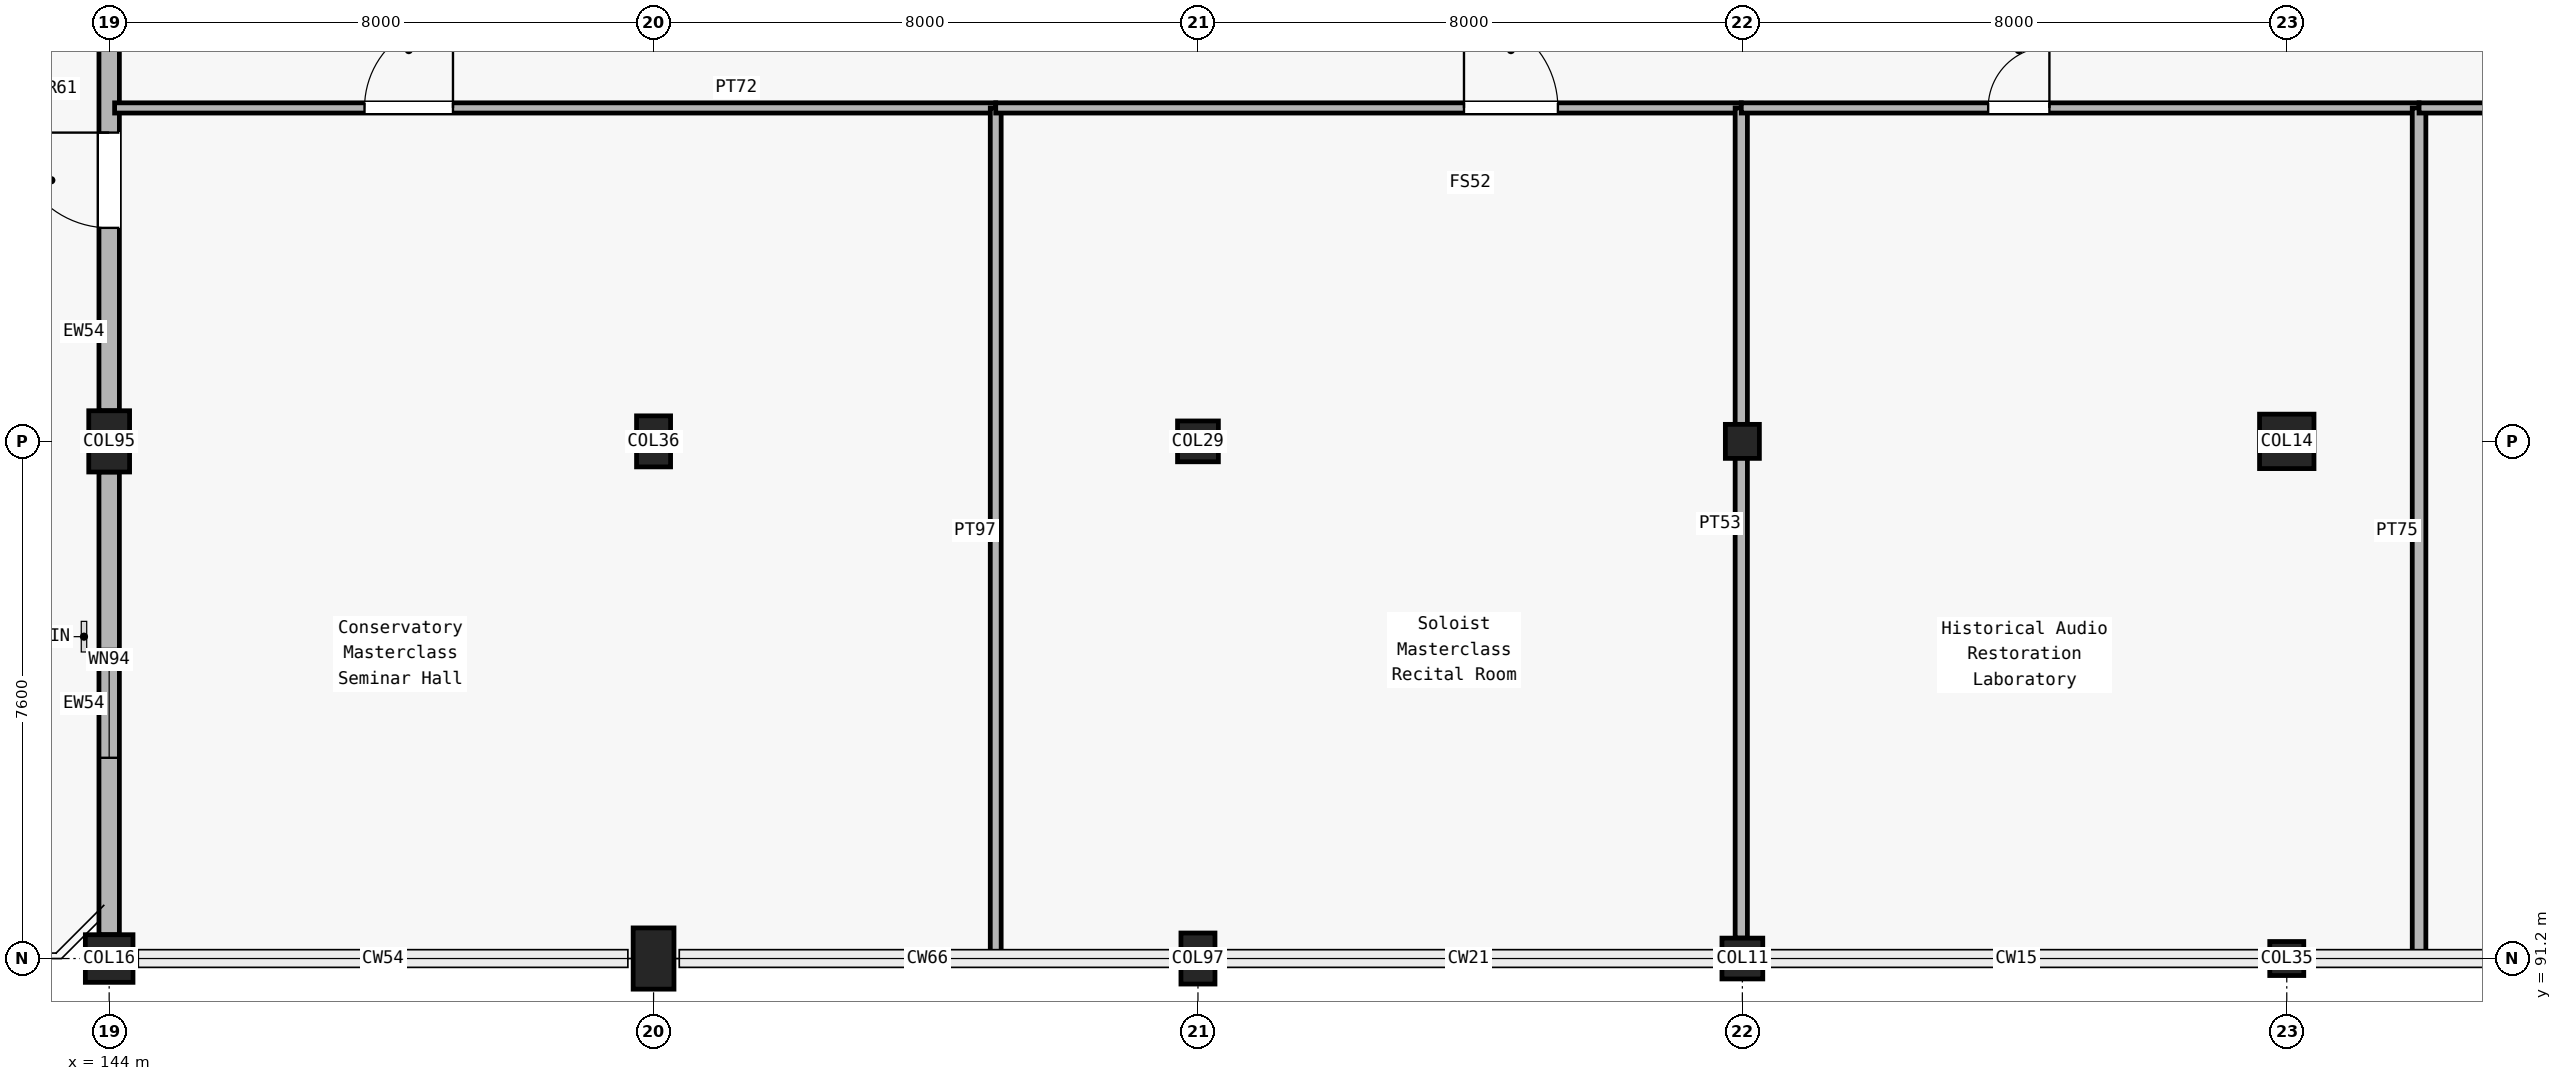
"""IFC4 building model, lengths in metres.
Left out: names, types, materials, properties, quantities, classifications, styles, units other than length and angle.
Written with IfcOpenShell. Run it as: python <this file> out.ifc"""

import sys

from ifc_helpers import new_model, si_unit, direction, frame, frame_2d, origin, origin_2d, place, context, subcontext, project, spatial, rectangle, circle, extrude, element, fill, save


model = new_model("IFC4")
c1 = context("Model", 3, precision=1e-05, world=origin(), true_north=direction((0.0, 1.0)))
c2 = subcontext(c1, "Body", "Model", "MODEL_VIEW")
j1 = project(units=[si_unit("LENGTHUNIT", "METRE"), si_unit("PLANEANGLEUNIT", "RADIAN")], contexts=[c1])
p1 = place(None, origin())
s1 = spatial("IfcSite", under=j1, at=p1, CompositionType="ELEMENT")
p2 = place(p1, origin())
s2 = spatial("IfcBuilding", under=s1, at=p2, CompositionType="ELEMENT")
p3 = place(p2, frame((0.0, 0.0, 24.6)))
s3 = spatial("IfcBuildingStorey", under=s2, at=p3, CompositionType="ELEMENT", Elevation=24.6)
p4 = place(p3, frame((144.0, 91.2, 0.0), z_axis=(0.0, 0.0, 1.0), x_axis=(1.0, 0.0, 0.0)))
e1 = element("IfcColumn", 1, at=p4, inside=s3, PredefinedType="COLUMN", context=c2, shape_type="SweptSolid", body=[
    extrude(rectangle(XDim=0.7, YDim=0.7, at=origin_2d()), origin(), (0.0, 0.0, 1.0), 4.8),
])
for number, where, z_axis, x_axis in (
    (2, (144.0, 98.8, 0.0), (0.0, 0.0, 1.0), (1.0, 0.0, 0.0)),
    (3, (152.0, 91.2, 0.0), (0.0, 0.0, 1.0), (1.0, 0.0, 0.0)),
):
    element("IfcColumn", number, at=place(p3, frame(where, z_axis=z_axis, x_axis=x_axis)), inside=s3, PredefinedType="COLUMN", context=c2, shape_type="SweptSolid", body=[
        extrude(rectangle(XDim=0.6, YDim=0.9, at=origin_2d()), origin(), (0.0, 0.0, 1.0), 4.8),
    ])
for number, where, z_axis, x_axis in (
    (4, (152.0, 98.8, 0.0), (0.0, 0.0, 1.0), (1.0, 0.0, 0.0)),
    (5, (160.0, 91.2, 0.0), (0.0, 0.0, 1.0), (1.0, 0.0, 0.0)),
):
    element("IfcColumn", number, at=place(p3, frame(where, z_axis=z_axis, x_axis=x_axis)), inside=s3, PredefinedType="COLUMN", context=c2, shape_type="SweptSolid", body=[
        extrude(rectangle(XDim=0.5, YDim=0.75, at=origin_2d()), origin(), (0.0, 0.0, 1.0), 4.8),
    ])
for number, where, z_axis, x_axis in (
    (6, (160.0, 98.8, 0.0), (0.0, 0.0, 1.0), (1.0, 0.0, 0.0)),
    (7, (168.0, 91.2, 0.0), (0.0, 0.0, 1.0), (1.0, 0.0, 0.0)),
):
    element("IfcColumn", number, at=place(p3, frame(where, z_axis=z_axis, x_axis=x_axis)), inside=s3, PredefinedType="COLUMN", context=c2, shape_type="SweptSolid", body=[
        extrude(rectangle(XDim=0.6, YDim=0.6, at=origin_2d()), origin(), (0.0, 0.0, 1.0), 4.8),
    ])
for number, where, z_axis, x_axis in (
    (8, (168.0, 98.8, 0.0), (0.0, 0.0, 1.0), (1.0, 0.0, 0.0)),
    (9, (176.0, 91.2, 0.0), (0.0, 0.0, 1.0), (1.0, 0.0, 0.0)),
):
    element("IfcColumn", number, at=place(p3, frame(where, z_axis=z_axis, x_axis=x_axis)), inside=s3, PredefinedType="COLUMN", context=c2, shape_type="SweptSolid", body=[
        extrude(rectangle(XDim=0.5, YDim=0.5, at=origin_2d()), origin(), (0.0, 0.0, 1.0), 4.8),
    ])
p5 = place(p3, frame((176.0, 98.8, 0.0), z_axis=(0.0, 0.0, 1.0), x_axis=(1.0, 0.0, 0.0)))
e10 = element("IfcColumn", 10, at=p5, inside=s3, PredefinedType="COLUMN", context=c2, shape_type="SweptSolid", body=[
    extrude(circle(Radius=0.4, at=origin_2d()), origin(), (0.0, 0.0, 1.0), 4.8),
])
p6 = place(p3, frame((144.0, 91.55, 0.0), z_axis=(0.0, 0.0, 1.0), x_axis=(0.0, 1.0, 0.0)))
e11 = element("IfcWall", 11, at=p6, inside=s3, PredefinedType="SOLIDWALL", context=c2, shape_type="SweptSolid", body=[
    extrude(rectangle(XDim=6.8, YDim=0.3, at=frame_2d((3.4, 0.0))), origin(), (0.0, 0.0, 1.0), 4.14),
])
p7 = place(p6, frame((2.6, 0.0, 0.95)))
e12 = element("IfcOpeningElement", 12, at=p7, cuts=e11, PredefinedType="OPENING", context=c2, shape_type="SweptSolid", body=[
    extrude(rectangle(XDim=1.6, YDim=1.95, at=frame_2d((0.8, 0.975))), frame((0.0, 0.16, 0.0), z_axis=(0.0, -1.0, 0.0), x_axis=(1.0, 0.0, 0.0)), (0.0, 0.0, 1.0), 0.32),
])
p8 = place(p3, frame((144.0, 99.25, 0.0), z_axis=(0.0, 0.0, 1.0), x_axis=(0.0, 1.0, 0.0)))
e13 = element("IfcWall", 13, at=p8, inside=s3, PredefinedType="SOLIDWALL", context=c2, shape_type="SweptSolid", body=[
    extrude(rectangle(XDim=6.775, YDim=0.3, at=frame_2d((3.387, 0.0))), origin(), (0.0, 0.0, 1.0), 4.14),
])
p9 = place(p8, frame((2.688, 0.0, 0.0)))
e14 = element("IfcOpeningElement", 14, at=p9, cuts=e13, PredefinedType="OPENING", context=c2, shape_type="SweptSolid", body=[
    extrude(rectangle(XDim=1.4, YDim=2.2, at=frame_2d((0.7, 1.1))), frame((0.0, 0.16, 0.0), z_axis=(0.0, -1.0, 0.0), x_axis=(1.0, 0.0, 0.0)), (0.0, 0.0, 1.0), 0.32),
])
p10 = place(p3, frame((144.08, 103.7, 0.0), z_axis=(0.0, 0.0, 1.0), x_axis=(1.0, 0.0, 0.0)))
e15 = element("IfcWall", 15, at=p10, inside=s3, PredefinedType="PARTITIONING", context=c2, shape_type="SweptSolid", body=[
    extrude(rectangle(XDim=12.948, YDim=0.15, at=frame_2d((6.474, 0.0))), origin(), (0.0, 0.0, 1.0), 3.9),
])
p11 = place(p10, frame((3.672, 0.0, 0.0)))
e16 = element("IfcOpeningElement", 16, at=p11, cuts=e15, PredefinedType="OPENING", context=c2, shape_type="SweptSolid", body=[
    extrude(rectangle(XDim=1.3, YDim=2.2, at=frame_2d((0.65, 1.1))), frame((0.0, 0.085, 0.0), z_axis=(0.0, -1.0, 0.0), x_axis=(1.0, 0.0, 0.0)), (0.0, 0.0, 1.0), 0.17),
])
p12 = place(p3, frame((157.028, 91.28, 0.0), z_axis=(0.0, 0.0, 1.0), x_axis=(0.0, 1.0, 0.0)))
e17 = element("IfcWall", 17, at=p12, inside=s3, PredefinedType="PARTITIONING", context=c2, shape_type="SweptSolid", body=[
    extrude(rectangle(XDim=12.42, YDim=0.16, at=frame_2d((6.21, 0.0))), origin(), (0.0, 0.0, 1.0), 3.9),
])
p13 = place(p3, frame((157.028, 103.7, 0.0), z_axis=(0.0, 0.0, 1.0), x_axis=(1.0, 0.0, 0.0)))
e18 = element("IfcWall", 18, at=p13, inside=s3, PredefinedType="PARTITIONING", context=c2, shape_type="SweptSolid", body=[
    extrude(rectangle(XDim=10.956, YDim=0.15, at=frame_2d((5.478, 0.0))), origin(), (0.0, 0.0, 1.0), 3.9),
])
p14 = place(p13, frame((6.881, 0.0, 0.0)))
e19 = element("IfcOpeningElement", 19, at=p14, cuts=e18, PredefinedType="OPENING", context=c2, shape_type="SweptSolid", body=[
    extrude(rectangle(XDim=1.38, YDim=2.2, at=frame_2d((0.69, 1.1))), frame((0.0, 0.085, 0.0), z_axis=(0.0, -1.0, 0.0), x_axis=(1.0, 0.0, 0.0)), (0.0, 0.0, 1.0), 0.17),
])
p15 = place(p3, frame((167.984, 91.5, 0.0), z_axis=(0.0, 0.0, 1.0), x_axis=(0.0, 1.0, 0.0)))
e20 = element("IfcWall", 20, at=p15, inside=s3, PredefinedType="PARTITIONING", context=c2, shape_type="SweptSolid", body=[
    extrude(rectangle(XDim=12.2, YDim=0.18, at=frame_2d((6.1, 0.0))), origin(), (0.0, 0.0, 1.0), 3.9),
])
p16 = place(p3, frame((167.984, 103.7, 0.0), z_axis=(0.0, 0.0, 1.0), x_axis=(1.0, 0.0, 0.0)))
e21 = element("IfcWall", 21, at=p16, inside=s3, PredefinedType="PARTITIONING", context=c2, shape_type="SweptSolid", body=[
    extrude(rectangle(XDim=9.96, YDim=0.15, at=frame_2d((4.98, 0.0))), origin(), (0.0, 0.0, 1.0), 3.9),
])
p17 = place(p16, frame((3.628, 0.0, 0.0)))
e22 = element("IfcOpeningElement", 22, at=p17, cuts=e21, PredefinedType="OPENING", context=c2, shape_type="SweptSolid", body=[
    extrude(rectangle(XDim=0.9, YDim=2.05, at=frame_2d((0.45, 1.025))), frame((0.0, 0.085, 0.0), z_axis=(0.0, -1.0, 0.0), x_axis=(1.0, 0.0, 0.0)), (0.0, 0.0, 1.0), 0.17),
])
p18 = place(p3, frame((177.944, 91.28, 0.0), z_axis=(0.0, 0.0, 1.0), x_axis=(0.0, 1.0, 0.0)))
e23 = element("IfcWall", 23, at=p18, inside=s3, PredefinedType="PARTITIONING", context=c2, shape_type="SweptSolid", body=[
    extrude(rectangle(XDim=12.42, YDim=0.2, at=frame_2d((6.21, 0.0))), origin(), (0.0, 0.0, 1.0), 3.9),
])
p19 = place(p3, frame((177.944, 103.7, 0.0), z_axis=(0.0, 0.0, 1.0), x_axis=(1.0, 0.0, 0.0)))
e24 = element("IfcWall", 24, at=p19, inside=s3, PredefinedType="PARTITIONING", context=c2, shape_type="SweptSolid", body=[
    extrude(rectangle(XDim=5.976, YDim=0.15, at=frame_2d((2.988, 0.0))), origin(), (0.0, 0.0, 1.0), 3.9),
])
p20 = place(p19, frame((1.581, 0.0, 0.0)))
e25 = element("IfcOpeningElement", 25, at=p20, cuts=e24, PredefinedType="OPENING", context=c2, shape_type="SweptSolid", body=[
    extrude(rectangle(XDim=0.94, YDim=2.05, at=frame_2d((0.47, 1.025))), frame((0.0, 0.085, 0.0), z_axis=(0.0, -1.0, 0.0), x_axis=(1.0, 0.0, 0.0)), (0.0, 0.0, 1.0), 0.17),
])
p21 = place(p7, origin())
e26 = element("IfcWindow", 26, at=p21, inside=s3, PartitioningType="SINGLE_PANEL", PredefinedType="WINDOW", context=c2, shape_type="SweptSolid", body=[
    extrude(rectangle(XDim=1.6, YDim=1.95, at=frame_2d((0.8, 0.975))), frame((0.0, 0.03, 0.0), z_axis=(0.0, -1.0, 0.0), x_axis=(1.0, 0.0, 0.0)), (0.0, 0.0, 1.0), 0.06),
])
fill(e12, e26)
p22 = place(p9, origin())
e27 = element("IfcDoor", 27, at=p22, inside=s3, OperationType="SINGLE_SWING_RIGHT", PredefinedType="DOOR", context=c2, shape_type="SweptSolid", body=[
    extrude(rectangle(XDim=1.4, YDim=2.2, at=frame_2d((0.7, 1.1))), frame((0.0, 0.025, 0.0), z_axis=(0.0, -1.0, 0.0), x_axis=(1.0, 0.0, 0.0)), (0.0, 0.0, 1.0), 0.05),
])
fill(e14, e27)
p23 = place(p11, origin())
e28 = element("IfcDoor", 28, at=p23, inside=s3, OperationType="SINGLE_SWING_RIGHT", PredefinedType="DOOR", context=c2, shape_type="SweptSolid", body=[
    extrude(rectangle(XDim=1.3, YDim=2.2, at=frame_2d((0.65, 1.1))), frame((0.0, 0.025, 0.0), z_axis=(0.0, -1.0, 0.0), x_axis=(1.0, 0.0, 0.0)), (0.0, 0.0, 1.0), 0.05),
])
fill(e16, e28)
p24 = place(p14, origin())
e29 = element("IfcDoor", 29, at=p24, inside=s3, OperationType="SINGLE_SWING_LEFT", PredefinedType="DOOR", context=c2, shape_type="SweptSolid", body=[
    extrude(rectangle(XDim=1.38, YDim=2.2, at=frame_2d((0.69, 1.1))), frame((0.0, 0.025, 0.0), z_axis=(0.0, -1.0, 0.0), x_axis=(1.0, 0.0, 0.0)), (0.0, 0.0, 1.0), 0.05),
])
fill(e19, e29)
p25 = place(p17, origin())
e30 = element("IfcDoor", 30, at=p25, inside=s3, OperationType="SINGLE_SWING_RIGHT", PredefinedType="DOOR", context=c2, shape_type="SweptSolid", body=[
    extrude(rectangle(XDim=0.9, YDim=2.05, at=frame_2d((0.45, 1.025))), frame((0.0, 0.025, 0.0), z_axis=(0.0, -1.0, 0.0), x_axis=(1.0, 0.0, 0.0)), (0.0, 0.0, 1.0), 0.05),
])
fill(e22, e30)
save(model, sys.argv[1])
